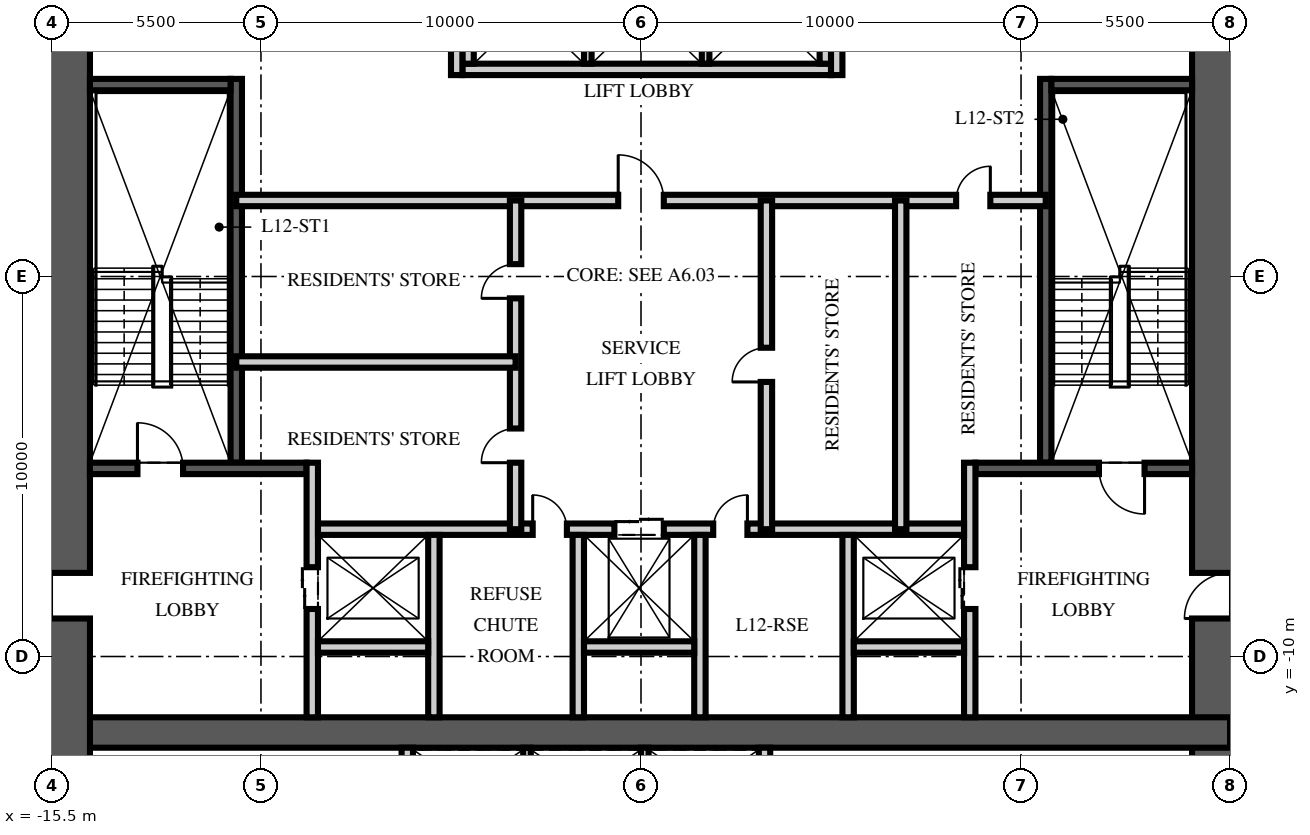
"""IFC4 building model, lengths in metres.
Left out: names, types, materials, properties, quantities, classifications, styles, units other than length and angle.
Written with IfcOpenShell. Run it as: python <this file> out.ifc"""

import sys

from ifc_helpers import new_model, si_unit, direction, frame, frame_2d, origin, place, context, subcontext, project, spatial, rectangle, extrude, element, fill, save


model = new_model("IFC4")
c1 = context("Model", 3, precision=1e-05, world=origin(), true_north=direction((0.0, 1.0)))
c2 = subcontext(c1, "Body", "Model", "MODEL_VIEW")
j1 = project(units=[si_unit("LENGTHUNIT", "METRE"), si_unit("PLANEANGLEUNIT", "RADIAN")], contexts=[c1])
p1 = place(None, origin())
s1 = spatial("IfcSite", under=j1, at=p1, CompositionType="ELEMENT")
p2 = place(p1, origin())
s2 = spatial("IfcBuilding", under=s1, at=p2, CompositionType="ELEMENT")
p3 = place(p2, frame((0.0, 0.0, 51.0)))
s3 = spatial("IfcBuildingStorey", under=s2, at=p3, CompositionType="ELEMENT", Elevation=51.0)
p4 = place(p3, frame((15.5, -15.5, -0.25), z_axis=(0.0, 0.0, 1.0), x_axis=(0.0, 1.0, 0.0)))
e1 = element("IfcWall", 1, at=p4, inside=s3, PredefinedType="SHEAR", context=c2, shape_type="SweptSolid", body=[
    extrude(rectangle(XDim=31.0, YDim=2.0, at=frame_2d((15.5, 0.0))), origin(), (0.0, 0.0, 1.0), 3.75),
])
p5 = place(p4, frame((6.5, 0.0, 0.25)))
e2 = element("IfcOpeningElement", 2, at=p5, cuts=e1, PredefinedType="OPENING", context=c2, shape_type="SweptSolid", body=[
    extrude(rectangle(XDim=1.2, YDim=2.1, at=frame_2d((0.6, 1.05))), frame((0.0, 1.01, 0.0), z_axis=(0.0, -1.0, 0.0), x_axis=(1.0, 0.0, 0.0)), (0.0, 0.0, 1.0), 2.02),
])
p6 = place(p4, frame((23.0, 0.0, 0.25)))
e3 = element("IfcOpeningElement", 3, at=p6, cuts=e1, PredefinedType="OPENING", context=c2, shape_type="SweptSolid", body=[
    extrude(rectangle(XDim=1.8, YDim=2.1, at=frame_2d((0.9, 1.05))), frame((0.0, 1.01, 0.0), z_axis=(0.0, -1.0, 0.0), x_axis=(1.0, 0.0, 0.0)), (0.0, 0.0, 1.0), 2.02),
])
p7 = place(p3, frame((-15.5, -12.0, -0.25), z_axis=(0.0, 0.0, 1.0), x_axis=(1.0, 0.0, 0.0)))
e4 = element("IfcWall", 4, at=p7, inside=s3, PredefinedType="SHEAR", context=c2, shape_type="SweptSolid", body=[
    extrude(rectangle(XDim=31.0, YDim=0.8, at=frame_2d((15.5, 0.0))), origin(), (0.0, 0.0, 1.0), 3.75),
])
p8 = place(p3, frame((-15.5, -15.5, -0.25), z_axis=(0.0, 0.0, 1.0), x_axis=(0.0, 1.0, 0.0)))
e5 = element("IfcWall", 5, at=p8, inside=s3, PredefinedType="SHEAR", context=c2, shape_type="SweptSolid", body=[
    extrude(rectangle(XDim=31.0, YDim=2.0, at=frame_2d((15.5, 0.0))), origin(), (0.0, 0.0, 1.0), 3.75),
])
p9 = place(p8, frame((6.5, 0.0, 0.25)))
e6 = element("IfcOpeningElement", 6, at=p9, cuts=e5, PredefinedType="OPENING", context=c2, shape_type="SweptSolid", body=[
    extrude(rectangle(XDim=1.2, YDim=2.1, at=frame_2d((0.6, 1.05))), frame((0.0, 1.01, 0.0), z_axis=(0.0, -1.0, 0.0), x_axis=(1.0, 0.0, 0.0)), (0.0, 0.0, 1.0), 2.02),
])
p10 = place(p8, frame((23.0, 0.0, 0.25)))
e7 = element("IfcOpeningElement", 7, at=p10, cuts=e5, PredefinedType="OPENING", context=c2, shape_type="SweptSolid", body=[
    extrude(rectangle(XDim=1.8, YDim=2.1, at=frame_2d((0.9, 1.05))), frame((0.0, 1.01, 0.0), z_axis=(0.0, -1.0, 0.0), x_axis=(1.0, 0.0, 0.0)), (0.0, 0.0, 1.0), 2.02),
])
p11 = place(p3, frame((-10.65, -4.9, 0.0), z_axis=(0.0, 0.0, 1.0), x_axis=(0.0, 1.0, 0.0)))
e8 = element("IfcWall", 8, at=p11, inside=s3, PredefinedType="SOLIDWALL", context=c2, shape_type="SweptSolid", body=[
    extrude(rectangle(XDim=10.1, YDim=0.3, at=frame_2d((5.05, 0.0))), origin(), (0.0, 0.0, 1.0), 3.5),
])
p12 = place(p3, frame((-14.5, -5.05, 0.0), z_axis=(0.0, 0.0, 1.0), x_axis=(1.0, 0.0, 0.0)))
e9 = element("IfcWall", 9, at=p12, inside=s3, PredefinedType="SOLIDWALL", context=c2, shape_type="SweptSolid", body=[
    extrude(rectangle(XDim=5.7, YDim=0.3, at=frame_2d((2.85, 0.0))), origin(), (0.0, 0.0, 1.0), 3.5),
])
p13 = place(p12, frame((1.25, 0.0, 0.0)))
e10 = element("IfcOpeningElement", 10, at=p13, cuts=e9, PredefinedType="OPENING", context=c2, shape_type="SweptSolid", body=[
    extrude(rectangle(XDim=1.2, YDim=2.1, at=frame_2d((0.6, 1.05))), frame((0.0, 0.16, 0.0), z_axis=(0.0, -1.0, 0.0), x_axis=(1.0, 0.0, 0.0)), (0.0, 0.0, 1.0), 0.32),
])
p14 = place(p3, frame((-14.5, 5.05, 0.0), z_axis=(0.0, 0.0, 1.0), x_axis=(1.0, 0.0, 0.0)))
e11 = element("IfcWall", 11, at=p14, inside=s3, PredefinedType="SOLIDWALL", context=c2, shape_type="SweptSolid", body=[
    extrude(rectangle(XDim=3.7, YDim=0.3, at=frame_2d((1.85, 0.0))), origin(), (0.0, 0.0, 1.0), 3.5),
])
p15 = place(p3, frame((-8.65, -11.6, 0.0), z_axis=(0.0, 0.0, 1.0), x_axis=(0.0, 1.0, 0.0)))
e12 = element("IfcWall", 12, at=p15, inside=s3, PredefinedType="PARTITIONING", context=c2, shape_type="SweptSolid", body=[
    extrude(rectangle(XDim=6.7, YDim=0.3, at=frame_2d((3.35, 0.0))), origin(), (0.0, 0.0, 1.0), 3.5),
])
p16 = place(p15, frame((2.85, 0.0, 0.0)))
e13 = element("IfcOpeningElement", 13, at=p16, cuts=e12, PredefinedType="OPENING", context=c2, shape_type="SweptSolid", body=[
    extrude(rectangle(XDim=1.1, YDim=2.1, at=frame_2d((0.55, 1.05))), frame((0.0, 0.16, 0.0), z_axis=(0.0, -1.0, 0.0), x_axis=(1.0, 0.0, 0.0)), (0.0, 0.0, 1.0), 0.32),
])
p17 = place(p3, frame((10.65, -4.9, 0.0), z_axis=(0.0, 0.0, 1.0), x_axis=(0.0, 1.0, 0.0)))
e14 = element("IfcWall", 14, at=p17, inside=s3, PredefinedType="SOLIDWALL", context=c2, shape_type="SweptSolid", body=[
    extrude(rectangle(XDim=10.1, YDim=0.3, at=frame_2d((5.05, 0.0))), origin(), (0.0, 0.0, 1.0), 3.5),
])
p18 = place(p3, frame((14.5, -5.05, 0.0), z_axis=(0.0, 0.0, 1.0), x_axis=(-1.0, 0.0, 0.0)))
e15 = element("IfcWall", 15, at=p18, inside=s3, PredefinedType="SOLIDWALL", context=c2, shape_type="SweptSolid", body=[
    extrude(rectangle(XDim=5.7, YDim=0.3, at=frame_2d((2.85, 0.0))), origin(), (0.0, 0.0, 1.0), 3.5),
])
p19 = place(p18, frame((1.25, 0.0, 0.0)))
e16 = element("IfcOpeningElement", 16, at=p19, cuts=e15, PredefinedType="OPENING", context=c2, shape_type="SweptSolid", body=[
    extrude(rectangle(XDim=1.2, YDim=2.1, at=frame_2d((0.6, 1.05))), frame((0.0, 0.16, 0.0), z_axis=(0.0, -1.0, 0.0), x_axis=(1.0, 0.0, 0.0)), (0.0, 0.0, 1.0), 0.32),
])
p20 = place(p3, frame((14.5, 5.05, 0.0), z_axis=(0.0, 0.0, 1.0), x_axis=(-1.0, 0.0, 0.0)))
e17 = element("IfcWall", 17, at=p20, inside=s3, PredefinedType="SOLIDWALL", context=c2, shape_type="SweptSolid", body=[
    extrude(rectangle(XDim=3.7, YDim=0.3, at=frame_2d((1.85, 0.0))), origin(), (0.0, 0.0, 1.0), 3.5),
])
p21 = place(p3, frame((8.65, -11.6, 0.0), z_axis=(0.0, 0.0, 1.0), x_axis=(0.0, 1.0, 0.0)))
e18 = element("IfcWall", 18, at=p21, inside=s3, PredefinedType="PARTITIONING", context=c2, shape_type="SweptSolid", body=[
    extrude(rectangle(XDim=6.7, YDim=0.3, at=frame_2d((3.35, 0.0))), origin(), (0.0, 0.0, 1.0), 3.5),
])
p22 = place(p21, frame((2.85, 0.0, 0.0)))
e19 = element("IfcOpeningElement", 19, at=p22, cuts=e18, PredefinedType="OPENING", context=c2, shape_type="SweptSolid", body=[
    extrude(rectangle(XDim=1.1, YDim=2.1, at=frame_2d((0.55, 1.05))), frame((0.0, 0.16, 0.0), z_axis=(0.0, -1.0, 0.0), x_axis=(1.0, 0.0, 0.0)), (0.0, 0.0, 1.0), 0.32),
])
p23 = place(p3, frame((-8.5, -6.65, 0.0), z_axis=(0.0, 0.0, 1.0), x_axis=(1.0, 0.0, 0.0)))
e20 = element("IfcWall", 20, at=p23, inside=s3, PredefinedType="PARTITIONING", context=c2, shape_type="SweptSolid", body=[
    extrude(rectangle(XDim=17.0, YDim=0.3, at=frame_2d((8.5, 0.0))), origin(), (0.0, 0.0, 1.0), 3.5),
])
p24 = place(p23, frame((7.8, 0.0, 0.0)))
e21 = element("IfcOpeningElement", 21, at=p24, cuts=e20, PredefinedType="OPENING", context=c2, shape_type="SweptSolid", body=[
    extrude(rectangle(XDim=1.3, YDim=2.4, at=frame_2d((0.65, 1.2))), frame((0.0, 0.16, 0.0), z_axis=(0.0, -1.0, 0.0), x_axis=(1.0, 0.0, 0.0)), (0.0, 0.0, 1.0), 0.32),
])
p25 = place(p23, frame((5.65, 0.0, 0.0)))
e22 = element("IfcOpeningElement", 22, at=p25, cuts=e20, PredefinedType="OPENING", context=c2, shape_type="SweptSolid", body=[
    extrude(rectangle(XDim=0.9, YDim=2.1, at=frame_2d((0.45, 1.05))), frame((0.0, 0.16, 0.0), z_axis=(0.0, -1.0, 0.0), x_axis=(1.0, 0.0, 0.0)), (0.0, 0.0, 1.0), 0.32),
])
p26 = place(p23, frame((10.4, 0.0, 0.0)))
e23 = element("IfcOpeningElement", 23, at=p26, cuts=e20, PredefinedType="OPENING", context=c2, shape_type="SweptSolid", body=[
    extrude(rectangle(XDim=0.9, YDim=2.1, at=frame_2d((0.45, 1.05))), frame((0.0, 0.16, 0.0), z_axis=(0.0, -1.0, 0.0), x_axis=(1.0, 0.0, 0.0)), (0.0, 0.0, 1.0), 0.32),
])
for number, where, z_axis, x_axis in (
    (24, (-5.45, -11.6, 0.0), (0.0, 0.0, 1.0), (0.0, 1.0, 0.0)),
    (25, (-1.65, -11.6, 0.0), (0.0, 0.0, 1.0), (0.0, 1.0, 0.0)),
    (26, (1.55, -11.6, 0.0), (0.0, 0.0, 1.0), (0.0, 1.0, 0.0)),
    (27, (5.45, -11.6, 0.0), (0.0, 0.0, 1.0), (0.0, 1.0, 0.0)),
):
    element("IfcWall", number, at=place(p3, frame(where, z_axis=z_axis, x_axis=x_axis)), inside=s3, PredefinedType="PARTITIONING", context=c2, shape_type="SweptSolid", body=[
        extrude(rectangle(XDim=4.8, YDim=0.3, at=frame_2d((2.4, 0.0))), origin(), (0.0, 0.0, 1.0), 3.5),
    ])
for number, where, z_axis, x_axis in (
    (28, (-8.5, -9.75, 0.0), (0.0, 0.0, 1.0), (1.0, 0.0, 0.0)),
    (29, (-1.5, -9.75, 0.0), (0.0, 0.0, 1.0), (1.0, 0.0, 0.0)),
    (30, (5.6, -9.75, 0.0), (0.0, 0.0, 1.0), (1.0, 0.0, 0.0)),
):
    element("IfcWall", number, at=place(p3, frame(where, z_axis=z_axis, x_axis=x_axis)), inside=s3, PredefinedType="PARTITIONING", context=c2, shape_type="SweptSolid", body=[
        extrude(rectangle(XDim=2.9, YDim=0.3, at=frame_2d((1.45, 0.0))), origin(), (0.0, 0.0, 1.0), 3.5),
    ])
p27 = place(p3, frame((-4.7, 5.45, 0.0), z_axis=(0.0, 0.0, 1.0), x_axis=(1.0, 0.0, 0.0)))
e31 = element("IfcWall", 31, at=p27, inside=s3, PredefinedType="PARTITIONING", context=c2, shape_type="SweptSolid", body=[
    extrude(rectangle(XDim=9.7, YDim=0.3, at=frame_2d((4.85, 0.0))), origin(), (0.0, 0.0, 1.0), 3.5),
])
for number, where, z_axis, x_axis in (
    (32, (-4.55, 5.6, 0.0), (0.0, 0.0, 1.0), (0.0, 1.0, 0.0)),
    (33, (4.85, 5.6, 0.0), (0.0, 0.0, 1.0), (0.0, 1.0, 0.0)),
):
    element("IfcWall", number, at=place(p3, frame(where, z_axis=z_axis, x_axis=x_axis)), inside=s3, PredefinedType="PARTITIONING", context=c2, shape_type="SweptSolid", body=[
        extrude(rectangle(XDim=2.8, YDim=0.3, at=frame_2d((1.4, 0.0))), origin(), (0.0, 0.0, 1.0), 3.5),
    ])
for number, where, z_axis, x_axis in (
    (34, (-1.4, 5.6, 0.0), (0.0, 0.0, 1.0), (0.0, 1.0, 0.0)),
    (35, (1.7, 5.6, 0.0), (0.0, 0.0, 1.0), (0.0, 1.0, 0.0)),
):
    element("IfcWall", number, at=place(p3, frame(where, z_axis=z_axis, x_axis=x_axis)), inside=s3, PredefinedType="PARTITIONING", context=c2, shape_type="SweptSolid", body=[
        extrude(rectangle(XDim=2.8, YDim=0.2, at=frame_2d((1.4, 0.0))), origin(), (0.0, 0.0, 1.0), 3.5),
    ])
for number, where, z_axis, x_axis in (
    (36, (-6.15, -14.5, 0.0), (0.0, 0.0, 1.0), (0.0, 1.0, 0.0)),
    (37, (3.25, -14.5, 0.0), (0.0, 0.0, 1.0), (0.0, 1.0, 0.0)),
):
    element("IfcWall", number, at=place(p3, frame(where, z_axis=z_axis, x_axis=x_axis)), inside=s3, PredefinedType="PARTITIONING", context=c2, shape_type="SweptSolid", body=[
        extrude(rectangle(XDim=2.1, YDim=0.3, at=frame_2d((1.05, 0.0))), origin(), (0.0, 0.0, 1.0), 3.5),
    ])
for number, where, z_axis, x_axis in (
    (38, (-3.0, -14.5, 0.0), (0.0, 0.0, 1.0), (0.0, 1.0, 0.0)),
    (39, (0.1, -14.5, 0.0), (0.0, 0.0, 1.0), (0.0, 1.0, 0.0)),
):
    element("IfcWall", number, at=place(p3, frame(where, z_axis=z_axis, x_axis=x_axis)), inside=s3, PredefinedType="PARTITIONING", context=c2, shape_type="SweptSolid", body=[
        extrude(rectangle(XDim=2.1, YDim=0.2, at=frame_2d((1.05, 0.0))), origin(), (0.0, 0.0, 1.0), 3.5),
    ])
p28 = place(p3, frame((-10.65, 2.0, 0.0), z_axis=(0.0, 0.0, 1.0), x_axis=(1.0, 0.0, 0.0)))
e40 = element("IfcWall", 40, at=p28, inside=s3, PredefinedType="PARTITIONING", context=c2, shape_type="SweptSolid", body=[
    extrude(rectangle(XDim=21.3, YDim=0.3, at=frame_2d((10.65, 0.0))), origin(), (0.0, 0.0, 1.0), 3.5),
])
p29 = place(p28, frame((10.05, 0.0, 0.0)))
e41 = element("IfcOpeningElement", 41, at=p29, cuts=e40, PredefinedType="OPENING", context=c2, shape_type="SweptSolid", body=[
    extrude(rectangle(XDim=1.2, YDim=2.1, at=frame_2d((0.6, 1.05))), frame((0.0, 0.16, 0.0), z_axis=(0.0, -1.0, 0.0), x_axis=(1.0, 0.0, 0.0)), (0.0, 0.0, 1.0), 0.32),
])
p30 = place(p28, frame((18.942, 0.0, 0.0)))
e42 = element("IfcOpeningElement", 42, at=p30, cuts=e40, PredefinedType="OPENING", context=c2, shape_type="SweptSolid", body=[
    extrude(rectangle(XDim=0.9, YDim=2.1, at=frame_2d((0.45, 1.05))), frame((0.0, 0.16, 0.0), z_axis=(0.0, -1.0, 0.0), x_axis=(1.0, 0.0, 0.0)), (0.0, 0.0, 1.0), 0.32),
])
p31 = place(p3, frame((-3.3, -6.65, 0.0), z_axis=(0.0, 0.0, 1.0), x_axis=(0.0, 1.0, 0.0)))
e43 = element("IfcWall", 43, at=p31, inside=s3, PredefinedType="PARTITIONING", context=c2, shape_type="SweptSolid", body=[
    extrude(rectangle(XDim=8.65, YDim=0.3, at=frame_2d((4.325, 0.0))), origin(), (0.0, 0.0, 1.0), 3.5),
])
p32 = place(p31, frame((1.75, 0.0, 0.0)))
e44 = element("IfcOpeningElement", 44, at=p32, cuts=e43, PredefinedType="OPENING", context=c2, shape_type="SweptSolid", body=[
    extrude(rectangle(XDim=0.9, YDim=2.1, at=frame_2d((0.45, 1.05))), frame((0.0, 0.16, 0.0), z_axis=(0.0, -1.0, 0.0), x_axis=(1.0, 0.0, 0.0)), (0.0, 0.0, 1.0), 0.32),
])
p33 = place(p31, frame((6.075, 0.0, 0.0)))
e45 = element("IfcOpeningElement", 45, at=p33, cuts=e43, PredefinedType="OPENING", context=c2, shape_type="SweptSolid", body=[
    extrude(rectangle(XDim=0.9, YDim=2.1, at=frame_2d((0.45, 1.05))), frame((0.0, 0.16, 0.0), z_axis=(0.0, -1.0, 0.0), x_axis=(1.0, 0.0, 0.0)), (0.0, 0.0, 1.0), 0.32),
])
p34 = place(p3, frame((3.3, -6.65, 0.0), z_axis=(0.0, 0.0, 1.0), x_axis=(0.0, 1.0, 0.0)))
e46 = element("IfcWall", 46, at=p34, inside=s3, PredefinedType="PARTITIONING", context=c2, shape_type="SweptSolid", body=[
    extrude(rectangle(XDim=8.65, YDim=0.3, at=frame_2d((4.325, 0.0))), origin(), (0.0, 0.0, 1.0), 3.5),
])
p35 = place(p34, frame((3.875, 0.0, 0.0)))
e47 = element("IfcOpeningElement", 47, at=p35, cuts=e46, PredefinedType="OPENING", context=c2, shape_type="SweptSolid", body=[
    extrude(rectangle(XDim=0.9, YDim=2.1, at=frame_2d((0.45, 1.05))), frame((0.0, 0.16, 0.0), z_axis=(0.0, -1.0, 0.0), x_axis=(1.0, 0.0, 0.0)), (0.0, 0.0, 1.0), 0.32),
])
p36 = place(p3, frame((-10.65, -2.25, 0.0), z_axis=(0.0, 0.0, 1.0), x_axis=(1.0, 0.0, 0.0)))
e48 = element("IfcWall", 48, at=p36, inside=s3, PredefinedType="PARTITIONING", context=c2, shape_type="SweptSolid", body=[
    extrude(rectangle(XDim=7.35, YDim=0.3, at=frame_2d((3.675, 0.0))), origin(), (0.0, 0.0, 1.0), 3.5),
])
p37 = place(p3, frame((6.834, -6.65, 0.0), z_axis=(0.0, 0.0, 1.0), x_axis=(0.0, 1.0, 0.0)))
e49 = element("IfcWall", 49, at=p37, inside=s3, PredefinedType="PARTITIONING", context=c2, shape_type="SweptSolid", body=[
    extrude(rectangle(XDim=8.65, YDim=0.3, at=frame_2d((4.325, 0.0))), origin(), (0.0, 0.0, 1.0), 3.5),
])
p38 = place(p3, frame((-4.85, 5.3, 0.0), z_axis=(0.0, 0.0, 1.0), x_axis=(0.0, 1.0, 0.0)))
e50 = element("IfcWall", 50, at=p38, inside=s3, PredefinedType="PARTITIONING", context=c2, shape_type="SweptSolid", body=[
    extrude(rectangle(XDim=6.3, YDim=0.3, at=frame_2d((3.15, 0.0))), origin(), (0.0, 0.0, 1.0), 3.5),
])
p39 = place(p38, frame((4.35, 0.0, 0.0)))
e51 = element("IfcOpeningElement", 51, at=p39, cuts=e50, PredefinedType="OPENING", context=c2, shape_type="SweptSolid", body=[
    extrude(rectangle(XDim=0.9, YDim=2.1, at=frame_2d((0.45, 1.05))), frame((0.0, 0.16, 0.0), z_axis=(0.0, -1.0, 0.0), x_axis=(1.0, 0.0, 0.0)), (0.0, 0.0, 1.0), 0.32),
])
p40 = place(p3, frame((5.15, 5.3, 0.0), z_axis=(0.0, 0.0, 1.0), x_axis=(0.0, 1.0, 0.0)))
e52 = element("IfcWall", 52, at=p40, inside=s3, PredefinedType="PARTITIONING", context=c2, shape_type="SweptSolid", body=[
    extrude(rectangle(XDim=6.3, YDim=0.3, at=frame_2d((3.15, 0.0))), origin(), (0.0, 0.0, 1.0), 3.5),
])
p41 = place(p13, origin())
e53 = element("IfcDoor", 53, at=p41, inside=s3, OperationType="SINGLE_SWING_LEFT", PredefinedType="DOOR", context=c2, shape_type="SweptSolid", body=[
    extrude(rectangle(XDim=1.2, YDim=2.1, at=frame_2d((0.6, 1.05))), frame((0.0, 0.025, 0.0), z_axis=(0.0, -1.0, 0.0), x_axis=(1.0, 0.0, 0.0)), (0.0, 0.0, 1.0), 0.05),
])
fill(e10, e53)
p42 = place(p9, origin())
e54 = element("IfcDoor", 54, at=p42, inside=s3, OperationType="SINGLE_SWING_LEFT", PredefinedType="DOOR", context=c2, shape_type="SweptSolid", body=[
    extrude(rectangle(XDim=1.2, YDim=2.1, at=frame_2d((0.6, 1.05))), frame((0.0, 0.025, 0.0), z_axis=(0.0, -1.0, 0.0), x_axis=(1.0, 0.0, 0.0)), (0.0, 0.0, 1.0), 0.05),
])
fill(e6, e54)
p43 = place(p19, origin())
e55 = element("IfcDoor", 55, at=p43, inside=s3, OperationType="SINGLE_SWING_LEFT", PredefinedType="DOOR", context=c2, shape_type="SweptSolid", body=[
    extrude(rectangle(XDim=1.2, YDim=2.1, at=frame_2d((0.6, 1.05))), frame((0.0, 0.025, 0.0), z_axis=(0.0, -1.0, 0.0), x_axis=(1.0, 0.0, 0.0)), (0.0, 0.0, 1.0), 0.05),
])
fill(e16, e55)
p44 = place(p5, origin())
e56 = element("IfcDoor", 56, at=p44, inside=s3, OperationType="SINGLE_SWING_LEFT", PredefinedType="DOOR", context=c2, shape_type="SweptSolid", body=[
    extrude(rectangle(XDim=1.2, YDim=2.1, at=frame_2d((0.6, 1.05))), frame((0.0, 0.025, 0.0), z_axis=(0.0, -1.0, 0.0), x_axis=(1.0, 0.0, 0.0)), (0.0, 0.0, 1.0), 0.05),
])
fill(e2, e56)
p45 = place(p16, origin())
e57 = element("IfcDoor", 57, at=p45, inside=s3, OperationType="DOUBLE_DOOR_SLIDING", PredefinedType="DOOR", context=c2, shape_type="SweptSolid", body=[
    extrude(rectangle(XDim=1.1, YDim=2.1, at=frame_2d((0.55, 1.05))), frame((0.0, 0.025, 0.0), z_axis=(0.0, -1.0, 0.0), x_axis=(1.0, 0.0, 0.0)), (0.0, 0.0, 1.0), 0.05),
])
fill(e13, e57)
p46 = place(p22, origin())
e58 = element("IfcDoor", 58, at=p46, inside=s3, OperationType="DOUBLE_DOOR_SLIDING", PredefinedType="DOOR", context=c2, shape_type="SweptSolid", body=[
    extrude(rectangle(XDim=1.1, YDim=2.1, at=frame_2d((0.55, 1.05))), frame((0.0, 0.025, 0.0), z_axis=(0.0, -1.0, 0.0), x_axis=(1.0, 0.0, 0.0)), (0.0, 0.0, 1.0), 0.05),
])
fill(e19, e58)
p47 = place(p24, origin())
e59 = element("IfcDoor", 59, at=p47, inside=s3, OperationType="DOUBLE_DOOR_SLIDING", PredefinedType="DOOR", context=c2, shape_type="SweptSolid", body=[
    extrude(rectangle(XDim=1.3, YDim=2.4, at=frame_2d((0.65, 1.2))), frame((0.0, 0.025, 0.0), z_axis=(0.0, -1.0, 0.0), x_axis=(1.0, 0.0, 0.0)), (0.0, 0.0, 1.0), 0.05),
])
fill(e21, e59)
p48 = place(p29, origin())
e60 = element("IfcDoor", 60, at=p48, inside=s3, OperationType="SINGLE_SWING_LEFT", PredefinedType="DOOR", context=c2, shape_type="SweptSolid", body=[
    extrude(rectangle(XDim=1.2, YDim=2.1, at=frame_2d((0.6, 1.05))), frame((0.0, 0.025, 0.0), z_axis=(0.0, -1.0, 0.0), x_axis=(1.0, 0.0, 0.0)), (0.0, 0.0, 1.0), 0.05),
])
fill(e41, e60)
p49 = place(p25, origin())
e61 = element("IfcDoor", 61, at=p49, inside=s3, OperationType="SINGLE_SWING_LEFT", PredefinedType="DOOR", context=c2, shape_type="SweptSolid", body=[
    extrude(rectangle(XDim=0.9, YDim=2.1, at=frame_2d((0.45, 1.05))), frame((0.0, 0.025, 0.0), z_axis=(0.0, -1.0, 0.0), x_axis=(1.0, 0.0, 0.0)), (0.0, 0.0, 1.0), 0.05),
])
fill(e22, e61)
p50 = place(p26, origin())
e62 = element("IfcDoor", 62, at=p50, inside=s3, OperationType="SINGLE_SWING_RIGHT", PredefinedType="DOOR", context=c2, shape_type="SweptSolid", body=[
    extrude(rectangle(XDim=0.9, YDim=2.1, at=frame_2d((0.45, 1.05))), frame((0.0, 0.025, 0.0), z_axis=(0.0, -1.0, 0.0), x_axis=(1.0, 0.0, 0.0)), (0.0, 0.0, 1.0), 0.05),
])
fill(e23, e62)
p51 = place(p32, origin())
e63 = element("IfcDoor", 63, at=p51, inside=s3, OperationType="SINGLE_SWING_LEFT", PredefinedType="DOOR", context=c2, shape_type="SweptSolid", body=[
    extrude(rectangle(XDim=0.9, YDim=2.1, at=frame_2d((0.45, 1.05))), frame((0.0, 0.025, 0.0), z_axis=(0.0, -1.0, 0.0), x_axis=(1.0, 0.0, 0.0)), (0.0, 0.0, 1.0), 0.05),
])
fill(e44, e63)
p52 = place(p33, origin())
e64 = element("IfcDoor", 64, at=p52, inside=s3, OperationType="SINGLE_SWING_LEFT", PredefinedType="DOOR", context=c2, shape_type="SweptSolid", body=[
    extrude(rectangle(XDim=0.9, YDim=2.1, at=frame_2d((0.45, 1.05))), frame((0.0, 0.025, 0.0), z_axis=(0.0, -1.0, 0.0), x_axis=(1.0, 0.0, 0.0)), (0.0, 0.0, 1.0), 0.05),
])
fill(e45, e64)
p53 = place(p35, origin())
e65 = element("IfcDoor", 65, at=p53, inside=s3, OperationType="SINGLE_SWING_LEFT", PredefinedType="DOOR", context=c2, shape_type="SweptSolid", body=[
    extrude(rectangle(XDim=0.9, YDim=2.1, at=frame_2d((0.45, 1.05))), frame((0.0, 0.025, 0.0), z_axis=(0.0, -1.0, 0.0), x_axis=(1.0, 0.0, 0.0)), (0.0, 0.0, 1.0), 0.05),
])
fill(e47, e65)
p54 = place(p30, origin())
e66 = element("IfcDoor", 66, at=p54, inside=s3, OperationType="SINGLE_SWING_RIGHT", PredefinedType="DOOR", context=c2, shape_type="SweptSolid", body=[
    extrude(rectangle(XDim=0.9, YDim=2.1, at=frame_2d((0.45, 1.05))), frame((0.0, 0.025, 0.0), z_axis=(0.0, -1.0, 0.0), x_axis=(1.0, 0.0, 0.0)), (0.0, 0.0, 1.0), 0.05),
])
fill(e42, e66)
save(model, sys.argv[1])
